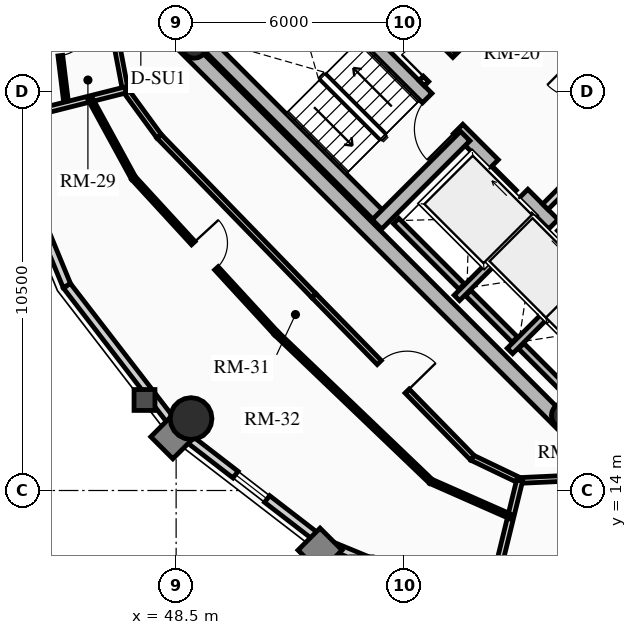
"""IFC4 building model, lengths in metres.
Left out: names, types, materials, properties, quantities, classifications, styles, units other than length and angle.
Written with IfcOpenShell. Run it as: python <this file> out.ifc"""

import sys

from ifc_helpers import new_model, si_unit, direction, frame, frame_2d, origin, origin_2d, place, context, subcontext, project, spatial, rectangle, circle, hollow_circle, extrude, source, transform, mapped, element, fill, save


model = new_model("IFC4")
c1 = context("Model", 3, precision=1e-05, world=origin(), true_north=direction((0.0, 1.0)))
c2 = subcontext(c1, "Body", "Model", "MODEL_VIEW")
j1 = project(units=[si_unit("LENGTHUNIT", "METRE"), si_unit("PLANEANGLEUNIT", "RADIAN")], contexts=[c1])
p1 = place(None, origin())
s1 = spatial("IfcSite", under=j1, at=p1, CompositionType="ELEMENT")
p2 = place(p1, origin())
s2 = spatial("IfcBuilding", under=s1, at=p2, CompositionType="ELEMENT")
p3 = place(p2, frame((0.0, 0.0, 214.12)))
s3 = spatial("IfcBuildingStorey", under=s2, at=p3, CompositionType="ELEMENT", Elevation=214.12)
for number, where, z_axis, x_axis in (
    (1, (58.702, 15.732, 0.0), (0.0, 0.0, 1.0), (-0.707, 0.707, 0.0)),
    (2, (66.268, 23.298, 0.0), (0.0, 0.0, 1.0), (-0.707, 0.707, 0.0)),
):
    element("IfcWall", number, at=place(p3, frame(where, z_axis=z_axis, x_axis=x_axis)), inside=s3, PredefinedType="SHEAR", context=c2, shape_type="SweptSolid", body=[
        extrude(rectangle(XDim=14.1, YDim=0.4, at=frame_2d((7.05, 0.0))), origin(), (0.0, 0.0, 1.0), 2.91),
    ])
p4 = place(p3, frame((58.561, 15.873, 0.0), z_axis=(0.0, 0.0, 1.0), x_axis=(0.707106781187, 0.707106781187, 0.0)))
e3 = element("IfcWall", 3, at=p4, inside=s3, PredefinedType="SHEAR", context=c2, shape_type="SweptSolid", body=[
    extrude(rectangle(XDim=10.7, YDim=0.4, at=frame_2d((5.35, 0.0))), origin(), (0.0, 0.0, 1.0), 2.91),
])
m1 = source(origin(), c2, "Body", "SweptSolid", [
    extrude(rectangle(XDim=1.5, YDim=2.02, at=frame_2d((0.75, 1.01))), frame((0.0, 0.21, 0.0), z_axis=(0.0, -1.0, 0.0), x_axis=(1.0, 0.0, 0.0)), (0.0, 0.0, 1.0), 0.42),
])
p5 = place(p4, frame((5.45, 0.0, 0.0)))
e4 = element("IfcOpeningElement", 4, at=p5, cuts=e3, PredefinedType="OPENING", context=c2, shape_type="MappedRepresentation", body=[
    mapped(m1, transform((0.0, 0.0, 0.0), x_axis=(1.0, 0.0, 0.0), y_axis=(0.0, 1.0, 0.0), z_axis=(0.0, 0.0, 1.0), scale=1.0)),
])
p6 = place(p3, frame((48.873, 25.561, 0.0), z_axis=(0.0, 0.0, 1.0), x_axis=(0.707106781187, 0.707106781187, 0.0)))
e5 = element("IfcWall", 5, at=p6, inside=s3, PredefinedType="SHEAR", context=c2, shape_type="SweptSolid", body=[
    extrude(rectangle(XDim=10.7, YDim=0.4, at=frame_2d((5.35, 0.0))), origin(), (0.0, 0.0, 1.0), 2.91),
])
p7 = place(p6, frame((4.6, 0.0, 0.0)))
e6 = element("IfcOpeningElement", 6, at=p7, cuts=e5, PredefinedType="OPENING", context=c2, shape_type="MappedRepresentation", body=[
    mapped(m1, transform((0.0, 0.0, 0.0), x_axis=(1.0, 0.0, 0.0), y_axis=(0.0, 1.0, 0.0), z_axis=(0.0, 0.0, 1.0), scale=1.0)),
])
p8 = place(p3, frame((61.06, 18.373, 0.0), z_axis=(0.0, 0.0, 1.0), x_axis=(-0.707106781187, 0.707106781187, 0.0)))
e7 = element("IfcWall", 7, at=p8, inside=s3, PredefinedType="SHEAR", context=c2, shape_type="SweptSolid", body=[
    extrude(rectangle(XDim=13.7, YDim=0.35, at=frame_2d((6.85, 0.0))), origin(), (0.0, 0.0, 1.0), 2.91),
])
m2 = source(origin(), c2, "Body", "SweptSolid", [
    extrude(rectangle(XDim=1.1, YDim=2.015, at=frame_2d((0.55, 1.007))), frame((0.0, 0.185, 0.0), z_axis=(0.0, -1.0, 0.0), x_axis=(1.0, 0.0, 0.0)), (0.0, 0.0, 1.0), 0.37),
])
p9 = place(p8, frame((4.85, 0.0, 0.0)))
e8 = element("IfcOpeningElement", 8, at=p9, cuts=e7, PredefinedType="OPENING", context=c2, shape_type="MappedRepresentation", body=[
    mapped(m2, transform((0.0, 0.0, 0.0), x_axis=(1.0, 0.0, 0.0), y_axis=(0.0, 1.0, 0.0), z_axis=(0.0, 0.0, 1.0), scale=1.0)),
])
p10 = place(p8, frame((0.625, 0.0, 0.0)))
e9 = element("IfcOpeningElement", 9, at=p10, cuts=e7, PredefinedType="OPENING", context=c2, shape_type="MappedRepresentation", body=[
    mapped(m2, transform((0.0, 0.0, 0.0), x_axis=(1.0, 0.0, 0.0), y_axis=(0.0, 1.0, 0.0), z_axis=(0.0, 0.0, 1.0), scale=1.0)),
])
p11 = place(p8, frame((2.625, 0.0, 0.0)))
e10 = element("IfcOpeningElement", 10, at=p11, cuts=e7, PredefinedType="OPENING", context=c2, shape_type="MappedRepresentation", body=[
    mapped(m2, transform((0.0, 0.0, 0.0), x_axis=(1.0, 0.0, 0.0), y_axis=(0.0, 1.0, 0.0), z_axis=(0.0, 0.0, 1.0), scale=1.0)),
])
m3 = source(origin(), c2, "Body", "SweptSolid", [
    extrude(rectangle(XDim=1.15, YDim=2.02, at=frame_2d((0.575, 1.01))), frame((0.0, 0.185, 0.0), z_axis=(0.0, -1.0, 0.0), x_axis=(1.0, 0.0, 0.0)), (0.0, 0.0, 1.0), 0.37),
])
p12 = place(p8, frame((7.27, 0.0, 0.0)))
e11 = element("IfcOpeningElement", 11, at=p12, cuts=e7, PredefinedType="OPENING", context=c2, shape_type="MappedRepresentation", body=[
    mapped(m3, transform((0.0, 0.0, 0.0), x_axis=(1.0, 0.0, 0.0), y_axis=(0.0, 1.0, 0.0), z_axis=(0.0, 0.0, 1.0), scale=1.0)),
])
p13 = place(p3, frame((63.627, 20.94, 0.0), z_axis=(0.0, 0.0, 1.0), x_axis=(-0.707119496762, 0.707094065383, 0.0)))
e12 = element("IfcWall", 12, at=p13, inside=s3, PredefinedType="SHEAR", context=c2, shape_type="SweptSolid", body=[
    extrude(rectangle(XDim=9.6, YDim=0.35, at=frame_2d((4.8, 0.0))), origin(), (0.0, 0.0, 1.0), 2.91),
])
p14 = place(p13, frame((5.28, 0.0, 0.0)))
e13 = element("IfcOpeningElement", 13, at=p14, cuts=e12, PredefinedType="OPENING", context=c2, shape_type="MappedRepresentation", body=[
    mapped(m3, transform((0.0, 0.0, 0.0), x_axis=(1.0, 0.0, 0.0), y_axis=(0.0, 1.0, 0.0), z_axis=(0.0, 0.0, 1.0), scale=1.0)),
])
p15 = place(p3, frame((53.922, 21.141, 0.0), z_axis=(0.0, 0.0, 1.0), x_axis=(-0.707106781187, 0.707106781187, 0.0)))
e14 = element("IfcWall", 14, at=p15, inside=s3, PredefinedType="SHEAR", context=c2, shape_type="SweptSolid", body=[
    extrude(rectangle(XDim=6.695, YDim=0.35, at=frame_2d((3.348, 0.0))), origin(), (0.0, 0.0, 1.0), 2.91),
])
p16 = place(p3, frame((53.784, 21.003, 0.0), z_axis=(0.0, 0.0, 1.0), x_axis=(0.707106781187, 0.707106781187, 0.0)))
e15 = element("IfcWall", 15, at=p16, inside=s3, PredefinedType="SHEAR", context=c2, shape_type="SweptSolid", body=[
    extrude(rectangle(XDim=3.285, YDim=0.35, at=frame_2d((1.643, 0.0))), origin(), (0.0, 0.0, 1.0), 2.91),
])
for number, where, z_axis, x_axis in (
    (16, (58.706, 15.976, 0.0), (0.0, 0.0, 1.0), (0.707, 0.707, 0.0)),
    (17, (48.976, 25.706, 0.0), (0.0, 0.0, 1.0), (0.707, 0.707, 0.0)),
):
    element("IfcColumn", number, at=place(p3, frame(where, z_axis=z_axis, x_axis=x_axis)), inside=s3, PredefinedType="COLUMN", context=c2, shape_type="SweptSolid", body=[
        extrude(hollow_circle(Radius=0.33, WallThickness=0.025, at=origin_2d()), origin(), (0.0, 0.0, 1.0), 2.91),
    ])
p17 = place(p3, frame((48.893, 15.893, 0.0), z_axis=(0.0, 0.0, 1.0), x_axis=(1.0, 0.0, 0.0)))
e18 = element("IfcColumn", 18, at=p17, inside=s3, PredefinedType="USERDEFINED", context=c2, shape_type="SweptSolid", body=[
    extrude(circle(Radius=0.55, at=origin_2d()), origin(), (0.0, 0.0, 1.0), 2.91),
])
p18 = place(p3, frame((45.626, 19.387, 0.0), z_axis=(0.0, 0.0, 1.0), x_axis=(-0.381309704956, 0.924447353237, 0.0)))
e19 = element("IfcWall", 19, at=p18, inside=s3, PredefinedType="SOLIDWALL", context=c2, shape_type="SweptSolid", body=[
    extrude(rectangle(XDim=4.671, YDim=0.22, at=frame_2d((2.335, 0.0))), origin(), (0.0, 0.0, 1.0), 2.322),
])
m4 = source(origin(), c2, "Body", "SweptSolid", [
    extrude(rectangle(XDim=1.05, YDim=1.3, at=frame_2d((0.525, 0.65))), frame((0.0, 0.12, 0.0), z_axis=(0.0, -1.0, 0.0), x_axis=(1.0, 0.0, 0.0)), (0.0, 0.0, 1.0), 0.24),
])
p19 = place(p18, frame((1.81, 0.0, 0.65)))
e20 = element("IfcOpeningElement", 20, at=p19, cuts=e19, PredefinedType="OPENING", context=c2, shape_type="MappedRepresentation", body=[
    mapped(m4, transform((0.0, 0.0, 0.0), x_axis=(1.0, 0.0, 0.0), y_axis=(0.0, 1.0, 0.0), z_axis=(0.0, 0.0, 1.0), scale=1.0)),
])
p20 = place(p3, frame((48.569, 15.569, 0.0), z_axis=(0.0, 0.0, 1.0), x_axis=(-0.610523083886, 0.791998462147, 0.0)))
e21 = element("IfcWall", 21, at=p20, inside=s3, PredefinedType="SOLIDWALL", context=c2, shape_type="SweptSolid", body=[
    extrude(rectangle(XDim=4.82, YDim=0.22, at=frame_2d((2.41, 0.0))), origin(), (0.0, 0.0, 1.0), 2.322),
])
p21 = place(p3, frame((52.387, 12.626, 0.0), z_axis=(0.0, 0.0, 1.0), x_axis=(-0.791998462147, 0.610523083886, 0.0)))
e22 = element("IfcWall", 22, at=p21, inside=s3, PredefinedType="SOLIDWALL", context=c2, shape_type="SweptSolid", body=[
    extrude(rectangle(XDim=4.82, YDim=0.22, at=frame_2d((2.41, 0.0))), origin(), (0.0, 0.0, 1.0), 2.322),
])
p22 = place(p21, frame((1.885, 0.0, 0.65)))
e23 = element("IfcOpeningElement", 23, at=p22, cuts=e22, PredefinedType="OPENING", context=c2, shape_type="MappedRepresentation", body=[
    mapped(m4, transform((0.0, 0.0, 0.0), x_axis=(1.0, 0.0, 0.0), y_axis=(0.0, 1.0, 0.0), z_axis=(0.0, 0.0, 1.0), scale=1.0)),
])
p23 = place(p3, frame((56.705, 10.845, 0.0), z_axis=(0.0, 0.0, 1.0), x_axis=(-0.924447353237, 0.381309704956, 0.0)))
e24 = element("IfcWall", 24, at=p23, inside=s3, PredefinedType="SOLIDWALL", context=c2, shape_type="SweptSolid", body=[
    extrude(rectangle(XDim=4.671, YDim=0.22, at=frame_2d((2.335, 0.0))), origin(), (0.0, 0.0, 1.0), 2.322),
])
p24 = place(p3, frame((55.888, 19.069, 0.0), z_axis=(0.0, 0.0, 1.0), x_axis=(0.707106781187, 0.707106781187, 0.0)))
e25 = element("IfcWall", 25, at=p24, inside=s3, PredefinedType="SHEAR", context=c2, shape_type="SweptSolid", body=[
    extrude(rectangle(XDim=2.97, YDim=0.2, at=frame_2d((1.485, 0.0))), origin(), (0.0, 0.0, 1.0), 2.91),
])
p25 = place(p3, frame((56.015, 19.366, 0.0), z_axis=(0.0, 0.0, 1.0), x_axis=(-0.707106781187, 0.707106781187, 0.0)))
e26 = element("IfcWall", 26, at=p25, inside=s3, PredefinedType="SHEAR", context=c2, shape_type="SweptSolid", body=[
    extrude(rectangle(XDim=2.44, YDim=0.2, at=frame_2d((1.22, 0.0))), origin(), (0.0, 0.0, 1.0), 2.91),
])
p26 = place(p3, frame((57.284, 17.673, 0.0), z_axis=(0.0, 0.0, 1.0), x_axis=(0.707147878904, 0.70706568108, 0.0)))
e27 = element("IfcWall", 27, at=p26, inside=s3, PredefinedType="SHEAR", context=c2, shape_type="SweptSolid", body=[
    extrude(rectangle(XDim=2.97, YDim=0.2, at=frame_2d((1.485, 0.0))), origin(), (0.0, 0.0, 1.0), 2.91),
])
p27 = place(p3, frame((57.412, 17.97, 0.0), z_axis=(0.0, 0.0, 1.0), x_axis=(-0.707106781187, 0.707106781187, 0.0)))
e28 = element("IfcWall", 28, at=p27, inside=s3, PredefinedType="SHEAR", context=c2, shape_type="SweptSolid", body=[
    extrude(rectangle(XDim=1.735, YDim=0.2, at=frame_2d((0.867, 0.0))), origin(), (0.0, 0.0, 1.0), 2.91),
])
p28 = place(p3, frame((58.737, 16.644, 0.0), z_axis=(0.0, 0.0, 1.0), x_axis=(-0.707032117043, 0.707181437447, 0.0)))
e29 = element("IfcWall", 29, at=p28, inside=s3, PredefinedType="SHEAR", context=c2, shape_type="SweptSolid", body=[
    extrude(rectangle(XDim=1.635, YDim=0.2, at=frame_2d((0.817, 0.0))), origin(), (0.0, 0.0, 1.0), 2.91),
])
p29 = place(p3, frame((58.214, 21.467, 0.0), z_axis=(0.0, 0.0, 1.0), x_axis=(0.707106781187, 0.707106781187, 0.0)))
e30 = element("IfcWall", 30, at=p29, inside=s3, PredefinedType="PARTITIONING", context=c2, shape_type="SweptSolid", body=[
    extrude(rectangle(XDim=3.28, YDim=0.2, at=frame_2d((1.64, 0.0))), origin(), (0.0, 0.0, 1.0), 2.685),
])
m5 = source(origin(), c2, "Body", "SweptSolid", [
    extrude(rectangle(XDim=1.5, YDim=2.02, at=frame_2d((0.75, 1.01))), frame((0.0, 0.11, 0.0), z_axis=(0.0, -1.0, 0.0), x_axis=(1.0, 0.0, 0.0)), (0.0, 0.0, 1.0), 0.22),
])
p30 = place(p29, frame((1.55, 0.0, 0.0)))
e31 = element("IfcOpeningElement", 31, at=p30, cuts=e30, PredefinedType="OPENING", context=c2, shape_type="MappedRepresentation", body=[
    mapped(m5, transform((0.0, 0.0, 0.0), x_axis=(1.0, 0.0, 0.0), y_axis=(0.0, 1.0, 0.0), z_axis=(0.0, 0.0, 1.0), scale=1.0)),
])
p31 = place(p3, frame((54.961, 24.719, 0.0), z_axis=(0.0, 0.0, 1.0), x_axis=(0.707106781187, 0.707106781187, 0.0)))
e32 = element("IfcWall", 32, at=p31, inside=s3, PredefinedType="PARTITIONING", context=c2, shape_type="SweptSolid", body=[
    extrude(rectangle(XDim=3.28, YDim=0.2, at=frame_2d((1.64, 0.0))), origin(), (0.0, 0.0, 1.0), 2.685),
])
m6 = source(origin(), c2, "Body", "SweptSolid", [
    extrude(rectangle(XDim=0.9, YDim=2.005, at=frame_2d((0.45, 1.002))), frame((0.0, 0.11, 0.0), z_axis=(0.0, -1.0, 0.0), x_axis=(1.0, 0.0, 0.0)), (0.0, 0.0, 1.0), 0.22),
])
p32 = place(p31, frame((0.16, 0.0, 0.0)))
e33 = element("IfcOpeningElement", 33, at=p32, cuts=e32, PredefinedType="OPENING", context=c2, shape_type="MappedRepresentation", body=[
    mapped(m6, transform((0.0, 0.0, 0.0), x_axis=(1.0, 0.0, 0.0), y_axis=(0.0, 1.0, 0.0), z_axis=(0.0, 0.0, 1.0), scale=1.0)),
])
p33 = place(p3, frame((46.912, 25.862, 0.0), z_axis=(0.0, 0.0, 1.0), x_axis=(0.186095172215, -0.98253172309, 0.0)))
e34 = element("IfcWall", 34, at=p33, inside=s3, PredefinedType="PARTITIONING", context=c2, shape_type="SweptSolid", body=[
    extrude(rectangle(XDim=1.346, YDim=0.15, at=frame_2d((0.673, 0.0))), origin(), (0.0, 0.0, 1.0), 2.322),
])
p34 = place(p3, frame((47.163, 24.54, 0.0), z_axis=(0.0, 0.0, 1.0), x_axis=(0.589711902124, -0.807613690135, 0.0)))
e35 = element("IfcWall", 35, at=p34, inside=s3, PredefinedType="PARTITIONING", context=c2, shape_type="SweptSolid", body=[
    extrude(rectangle(XDim=1.507, YDim=0.15, at=frame_2d((0.753, 0.0))), origin(), (0.0, 0.0, 1.0), 2.255),
])
p35 = place(p3, frame((48.052, 23.323, 0.0), z_axis=(0.0, 0.0, 1.0), x_axis=(0.696573981306, -0.717484974454, 0.0)))
e36 = element("IfcWall", 36, at=p35, inside=s3, PredefinedType="PARTITIONING", context=c2, shape_type="SweptSolid", body=[
    extrude(rectangle(XDim=5.849, YDim=0.15, at=frame_2d((2.925, 0.0))), origin(), (0.0, 0.0, 1.0), 2.685),
])
p36 = place(p3, frame((52.126, 19.126, 0.0), z_axis=(0.0, 0.0, 1.0), x_axis=(0.698979087027, -0.715142108884, 0.0)))
e37 = element("IfcWall", 37, at=p36, inside=s3, PredefinedType="PARTITIONING", context=c2, shape_type="SweptSolid", body=[
    extrude(rectangle(XDim=5.966, YDim=0.15, at=frame_2d((2.983, 0.0))), origin(), (0.0, 0.0, 1.0), 2.322),
])
m7 = source(origin(), c2, "Body", "SweptSolid", [
    extrude(rectangle(XDim=1.05, YDim=2.015, at=frame_2d((0.525, 1.007))), frame((0.0, 0.085, 0.0), z_axis=(0.0, -1.0, 0.0), x_axis=(1.0, 0.0, 0.0)), (0.0, 0.0, 1.0), 0.17),
])
p37 = place(p36, frame((2.458, 0.0, 0.0)))
e38 = element("IfcOpeningElement", 38, at=p37, cuts=e37, PredefinedType="OPENING", context=c2, shape_type="MappedRepresentation", body=[
    mapped(m7, transform((0.0, 0.0, 0.0), x_axis=(1.0, 0.0, 0.0), y_axis=(0.0, 1.0, 0.0), z_axis=(0.0, 0.0, 1.0), scale=1.0)),
])
p38 = place(p3, frame((56.296, 14.859, 0.0), z_axis=(0.0, 0.0, 1.0), x_axis=(0.90178292445, -0.432189260823, 0.0)))
e39 = element("IfcWall", 39, at=p38, inside=s3, PredefinedType="PARTITIONING", context=c2, shape_type="SweptSolid", body=[
    extrude(rectangle(XDim=1.377, YDim=0.15, at=frame_2d((0.688, 0.0))), origin(), (0.0, 0.0, 1.0), 2.255),
])
p39 = place(p3, frame((57.538, 14.264, 0.0), z_axis=(0.0, 0.0, 1.0), x_axis=(0.99892990172, 0.046249880546, 0.0)))
e40 = element("IfcWall", 40, at=p39, inside=s3, PredefinedType="PARTITIONING", context=c2, shape_type="SweptSolid", body=[
    extrude(rectangle(XDim=1.446, YDim=0.15, at=frame_2d((0.723, 0.0))), origin(), (0.0, 0.0, 1.0), 2.322),
])
p40 = place(p3, frame((47.163, 24.54, 0.0), z_axis=(0.0, 0.0, 1.0), x_axis=(-0.9696166611, -0.244629373781, 0.0)))
e41 = element("IfcWall", 41, at=p40, inside=s3, PredefinedType="PARTITIONING", context=c2, shape_type="SweptSolid", body=[
    extrude(rectangle(XDim=3.401, YDim=0.16, at=frame_2d((1.701, 0.0))), origin(), (0.0, 0.0, 1.0), 2.322),
])
p41 = place(p3, frame((57.538, 14.264, 0.0), z_axis=(0.0, 0.0, 1.0), x_axis=(-0.237377006249, -0.971417601706, 0.0)))
e42 = element("IfcWall", 42, at=p41, inside=s3, PredefinedType="PARTITIONING", context=c2, shape_type="SweptSolid", body=[
    extrude(rectangle(XDim=3.499, YDim=0.16, at=frame_2d((1.75, 0.0))), origin(), (0.0, 0.0, 1.0), 2.322),
])
p42 = place(p3, frame((45.328, 26.457, 0.0), z_axis=(0.0, 0.0, 1.0), x_axis=(0.122605181354, -0.992455525203, 0.0)))
e43 = element("IfcWall", 43, at=p42, inside=s3, PredefinedType="PARTITIONING", context=c2, shape_type="SweptSolid", body=[
    extrude(rectangle(XDim=2.228, YDim=0.125, at=frame_2d((1.114, 0.0))), origin(), (0.0, 0.0, 1.0), 2.322),
])
m8 = source(origin(), c2, "Body", "SweptSolid", [
    extrude(rectangle(XDim=0.9, YDim=2.005, at=frame_2d((0.45, 1.002))), frame((0.0, 0.073, 0.0), z_axis=(0.0, -1.0, 0.0), x_axis=(1.0, 0.0, 0.0)), (0.0, 0.0, 1.0), 0.145),
])
p43 = place(p42, frame((0.12, 0.0, 0.0)))
e44 = element("IfcOpeningElement", 44, at=p43, cuts=e43, PredefinedType="OPENING", context=c2, shape_type="MappedRepresentation", body=[
    mapped(m8, transform((0.0, 0.0, 0.0), x_axis=(1.0, 0.0, 0.0), y_axis=(0.0, 1.0, 0.0), z_axis=(0.0, 0.0, 1.0), scale=1.0)),
])
p44 = place(p3, frame((46.24, 24.307, 0.0), z_axis=(0.0, 0.0, 1.0), x_axis=(0.479212341296, -0.87769899849, 0.0)))
e45 = element("IfcWall", 45, at=p44, inside=s3, PredefinedType="PARTITIONING", context=c2, shape_type="SweptSolid", body=[
    extrude(rectangle(XDim=2.374, YDim=0.125, at=frame_2d((1.187, 0.0))), origin(), (0.0, 0.0, 1.0), 2.255),
])
p45 = place(p3, frame((47.377, 22.223, 0.0), z_axis=(0.0, 0.0, 1.0), x_axis=(0.676554417653, -0.736392639802, 0.0)))
e46 = element("IfcWall", 46, at=p45, inside=s3, PredefinedType="PARTITIONING", context=c2, shape_type="SweptSolid", body=[
    extrude(rectangle(XDim=5.553, YDim=0.125, at=frame_2d((2.776, 0.0))), origin(), (0.0, 0.0, 1.0), 2.685),
])
p46 = place(p45, frame((2.326, 0.0, 0.0)))
e47 = element("IfcOpeningElement", 47, at=p46, cuts=e46, PredefinedType="OPENING", context=c2, shape_type="MappedRepresentation", body=[
    mapped(m8, transform((0.0, 0.0, 0.0), x_axis=(1.0, 0.0, 0.0), y_axis=(0.0, 1.0, 0.0), z_axis=(0.0, 0.0, 1.0), scale=1.0)),
])
p47 = place(p3, frame((51.134, 18.134, 0.0), z_axis=(0.0, 0.0, 1.0), x_axis=(0.722450775654, -0.691422357721, 0.0)))
e48 = element("IfcWall", 48, at=p47, inside=s3, PredefinedType="PARTITIONING", context=c2, shape_type="SweptSolid", body=[
    extrude(rectangle(XDim=5.634, YDim=0.125, at=frame_2d((2.817, 0.0))), origin(), (0.0, 0.0, 1.0), 2.322),
])
p48 = place(p3, frame((55.204, 14.239, 0.0), z_axis=(0.0, 0.0, 1.0), x_axis=(0.914999746908, -0.403454412738, 0.0)))
e49 = element("IfcWall", 49, at=p48, inside=s3, PredefinedType="PARTITIONING", context=c2, shape_type="SweptSolid", body=[
    extrude(rectangle(XDim=2.297, YDim=0.125, at=frame_2d((1.148, 0.0))), origin(), (0.0, 0.0, 1.0), 2.255),
])
m9 = source(origin(), c2, "Body", "SweptSolid", [
    extrude(rectangle(XDim=1.05, YDim=1.3, at=frame_2d((0.525, 0.65))), frame((0.0, 0.03, 0.0), z_axis=(0.0, -1.0, 0.0), x_axis=(1.0, 0.0, 0.0)), (0.0, 0.0, 1.0), 0.06),
])
p49 = place(p22, origin())
e50 = element("IfcWindow", 50, at=p49, inside=s3, PartitioningType="SINGLE_PANEL", PredefinedType="WINDOW", context=c2, shape_type="MappedRepresentation", body=[
    mapped(m9, transform((0.0, 0.0, 0.0), x_axis=(1.0, 0.0, 0.0), y_axis=(0.0, 1.0, 0.0), z_axis=(0.0, 0.0, 1.0), scale=1.0)),
])
fill(e23, e50)
m10 = source(origin(), c2, "Body", "SweptSolid", [
    extrude(rectangle(XDim=1.1, YDim=2.015, at=frame_2d((0.55, 1.007))), frame((0.0, 0.025, 0.0), z_axis=(0.0, -1.0, 0.0), x_axis=(1.0, 0.0, 0.0)), (0.0, 0.0, 1.0), 0.05),
])
p50 = place(p9, origin())
e51 = element("IfcDoor", 51, at=p50, inside=s3, OperationType="SLIDING_TO_RIGHT", PredefinedType="DOOR", context=c2, shape_type="MappedRepresentation", body=[
    mapped(m10, transform((0.0, 0.0, 0.0), x_axis=(1.0, 0.0, 0.0), y_axis=(0.0, 1.0, 0.0), z_axis=(0.0, 0.0, 1.0), scale=1.0)),
])
fill(e8, e51)
p51 = place(p11, origin())
e52 = element("IfcDoor", 52, at=p51, inside=s3, OperationType="SLIDING_TO_LEFT", PredefinedType="DOOR", context=c2, shape_type="MappedRepresentation", body=[
    mapped(m10, transform((0.0, 0.0, 0.0), x_axis=(1.0, 0.0, 0.0), y_axis=(0.0, 1.0, 0.0), z_axis=(0.0, 0.0, 1.0), scale=1.0)),
])
fill(e10, e52)
m11 = source(origin(), c2, "Body", "SweptSolid", [
    extrude(rectangle(XDim=1.15, YDim=2.02, at=frame_2d((0.575, 1.01))), frame((0.0, 0.025, 0.0), z_axis=(0.0, -1.0, 0.0), x_axis=(1.0, 0.0, 0.0)), (0.0, 0.0, 1.0), 0.05),
])
p52 = place(p12, origin())
e53 = element("IfcDoor", 53, at=p52, inside=s3, OperationType="SINGLE_SWING_LEFT", PredefinedType="DOOR", context=c2, shape_type="MappedRepresentation", body=[
    mapped(m11, transform((0.0, 0.0, 0.0), x_axis=(1.0, 0.0, 0.0), y_axis=(0.0, 1.0, 0.0), z_axis=(0.0, 0.0, 1.0), scale=1.0)),
])
fill(e11, e53)
m12 = source(origin(), c2, "Body", "SweptSolid", [
    extrude(rectangle(XDim=0.9, YDim=2.005, at=frame_2d((0.45, 1.002))), frame((0.0, 0.025, 0.0), z_axis=(0.0, -1.0, 0.0), x_axis=(1.0, 0.0, 0.0)), (0.0, 0.0, 1.0), 0.05),
])
p53 = place(p32, origin())
e54 = element("IfcDoor", 54, at=p53, inside=s3, OperationType="SINGLE_SWING_LEFT", PredefinedType="DOOR", context=c2, shape_type="MappedRepresentation", body=[
    mapped(m12, transform((0.0, 0.0, 0.0), x_axis=(1.0, 0.0, 0.0), y_axis=(0.0, 1.0, 0.0), z_axis=(0.0, 0.0, 1.0), scale=1.0)),
])
fill(e33, e54)
p54 = place(p43, origin())
e55 = element("IfcDoor", 55, at=p54, inside=s3, OperationType="SINGLE_SWING_LEFT", PredefinedType="DOOR", context=c2, shape_type="MappedRepresentation", body=[
    mapped(m12, transform((0.0, 0.0, 0.0), x_axis=(1.0, 0.0, 0.0), y_axis=(0.0, 1.0, 0.0), z_axis=(0.0, 0.0, 1.0), scale=1.0)),
])
fill(e44, e55)
m13 = source(origin(), c2, "Body", "SweptSolid", [
    extrude(rectangle(XDim=1.05, YDim=2.015, at=frame_2d((0.525, 1.007))), frame((0.0, 0.025, 0.0), z_axis=(0.0, -1.0, 0.0), x_axis=(1.0, 0.0, 0.0)), (0.0, 0.0, 1.0), 0.05),
])
p55 = place(p37, origin())
e56 = element("IfcDoor", 56, at=p55, inside=s3, OperationType="SINGLE_SWING_RIGHT", PredefinedType="DOOR", context=c2, shape_type="MappedRepresentation", body=[
    mapped(m13, transform((0.0, 0.0, 0.0), x_axis=(1.0, 0.0, 0.0), y_axis=(0.0, 1.0, 0.0), z_axis=(0.0, 0.0, 1.0), scale=1.0)),
])
fill(e38, e56)
p56 = place(p46, origin())
e57 = element("IfcDoor", 57, at=p56, inside=s3, OperationType="SINGLE_SWING_LEFT", PredefinedType="DOOR", context=c2, shape_type="MappedRepresentation", body=[
    mapped(m12, transform((0.0, 0.0, 0.0), x_axis=(1.0, 0.0, 0.0), y_axis=(0.0, 1.0, 0.0), z_axis=(0.0, 0.0, 1.0), scale=1.0)),
])
fill(e47, e57)
save(model, sys.argv[1])
